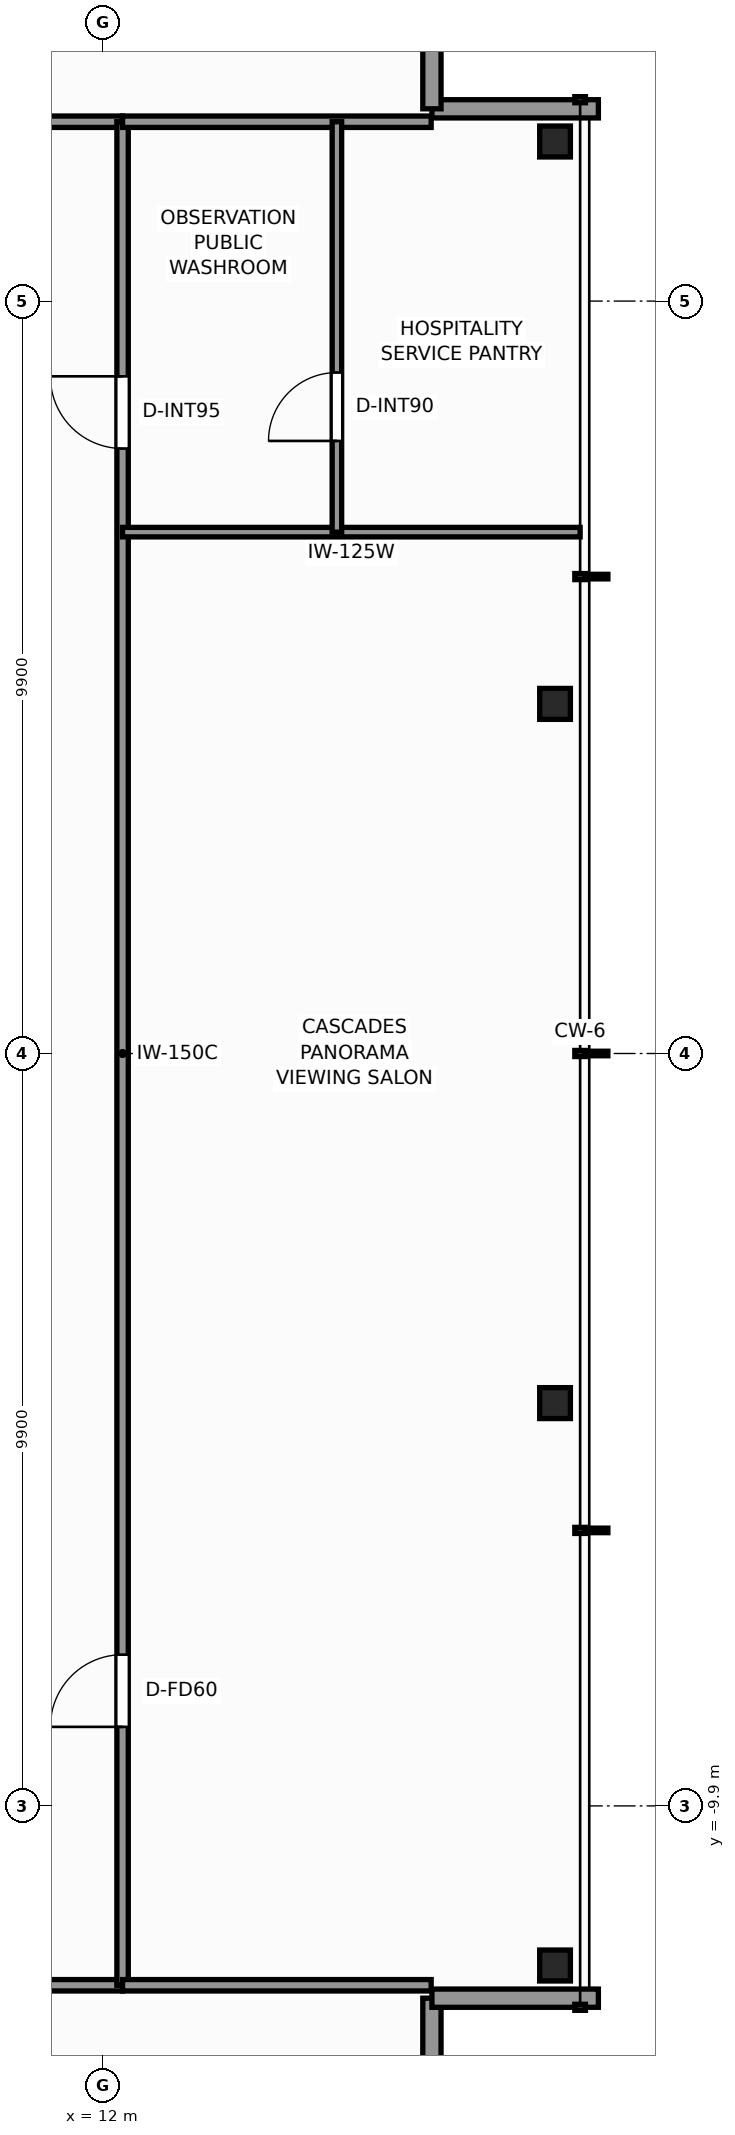
"""IFC4 building model, lengths in metres.
Left out: names, types, materials, properties, quantities, classifications, styles, units other than length and angle.
Written with IfcOpenShell. Run it as: python <this file> out.ifc"""

import sys

from ifc_helpers import new_model, si_unit, direction, frame, frame_2d, origin, origin_2d, place, context, subcontext, project, spatial, rectangle, i_section, extrude, element, fill, save


model = new_model("IFC4")
c1 = context("Model", 3, precision=1e-05, world=origin(), true_north=direction((0.0, 1.0)))
c2 = subcontext(c1, "Body", "Model", "MODEL_VIEW")
j1 = project(units=[si_unit("LENGTHUNIT", "METRE"), si_unit("PLANEANGLEUNIT", "RADIAN")], contexts=[c1])
p1 = place(None, origin())
s1 = spatial("IfcSite", under=j1, at=p1, CompositionType="ELEMENT")
p2 = place(p1, origin())
s2 = spatial("IfcBuilding", under=s1, at=p2, CompositionType="ELEMENT")
p3 = place(p2, frame((0.0, 0.0, 267.4)))
s3 = spatial("IfcBuildingStorey", under=s2, at=p3, CompositionType="ELEMENT", Elevation=267.4)
for number, where, z_axis, x_axis in (
    (1, (17.95, -12.0, 0.0), (0.0, 0.0, 1.0), (1.0, 0.0, 0.0)),
    (2, (17.95, -4.6, 0.0), (0.0, 0.0, 1.0), (1.0, 0.0, 0.0)),
    (3, (17.95, 4.6, 0.0), (0.0, 0.0, 1.0), (1.0, 0.0, 0.0)),
    (4, (17.95, 12.0, 0.0), (0.0, 0.0, 1.0), (1.0, 0.0, 0.0)),
):
    element("IfcColumn", number, at=place(p3, frame(where, z_axis=z_axis, x_axis=x_axis)), inside=s3, PredefinedType="COLUMN", context=c2, shape_type="SweptSolid", body=[
        extrude(i_section(OverallWidth=0.404, OverallDepth=0.407, WebThickness=0.027, FlangeThickness=0.044, FilletRadius=0.025, at=origin_2d()), origin(), (0.0, 0.0, 1.0), 5.0),
    ])
p4 = place(p3, frame((16.33, -12.43, 0.0), z_axis=(0.0, 0.0, 1.0), x_axis=(0.0, -1.0, 0.0)))
e5 = element("IfcWall", 5, at=p4, inside=s3, PredefinedType="STANDARD", context=c2, shape_type="SweptSolid", body=[
    extrude(rectangle(XDim=2.19, YDim=0.24, at=frame_2d((1.095, 0.0))), origin(), (0.0, 0.0, 1.0), 4.083),
])
for number, where, z_axis, x_axis in (
    (6, (18.52, -12.43, 0.0), (0.0, 0.0, 1.0), (-1.0, 0.0, 0.0)),
    (7, (16.33, 12.43, 0.0), (0.0, 0.0, 1.0), (1.0, 0.0, 0.0)),
):
    element("IfcWall", number, at=place(p3, frame(where, z_axis=z_axis, x_axis=x_axis)), inside=s3, PredefinedType="STANDARD", context=c2, shape_type="SweptSolid", body=[
        extrude(rectangle(XDim=2.19, YDim=0.24, at=frame_2d((1.095, 0.0))), origin(), (0.0, 0.0, 1.0), 4.083),
    ])
p5 = place(p3, frame((16.33, 14.62, 0.0), z_axis=(0.0, 0.0, 1.0), x_axis=(0.0, -1.0, 0.0)))
e8 = element("IfcWall", 8, at=p5, inside=s3, PredefinedType="STANDARD", context=c2, shape_type="SweptSolid", body=[
    extrude(rectangle(XDim=2.19, YDim=0.24, at=frame_2d((1.095, 0.0))), origin(), (0.0, 0.0, 1.0), 4.083),
])
p6 = place(p3, frame((-12.26, -12.26, 0.0), z_axis=(0.0, 0.0, 1.0), x_axis=(1.0, 0.0, 0.0)))
e9 = element("IfcWall", 9, at=p6, inside=s3, PredefinedType="PARTITIONING", context=c2, shape_type="SweptSolid", body=[
    extrude(rectangle(XDim=24.52, YDim=0.15, at=frame_2d((12.26, 0.0))), origin(), (0.0, 0.0, 1.0), 3.989),
])
p7 = place(p6, frame((3.6, 0.0, 0.0)))
e10 = element("IfcOpeningElement", 10, at=p7, cuts=e9, PredefinedType="OPENING", context=c2, shape_type="SweptSolid", body=[
    extrude(rectangle(XDim=1.6, YDim=2.3, at=frame_2d((0.8, 1.15))), frame((0.0, 0.085, 0.0), z_axis=(0.0, -1.0, 0.0), x_axis=(1.0, 0.0, 0.0)), (0.0, 0.0, 1.0), 0.17),
])
p8 = place(p6, frame((12.26, 0.0, 0.0)))
e11 = element("IfcOpeningElement", 11, at=p8, cuts=e9, PredefinedType="OPENING", context=c2, shape_type="SweptSolid", body=[
    extrude(rectangle(XDim=1.2, YDim=2.2, at=frame_2d((0.6, 1.1))), frame((0.0, 0.085, 0.0), z_axis=(0.0, -1.0, 0.0), x_axis=(1.0, 0.0, 0.0)), (0.0, 0.0, 1.0), 0.17),
])
p9 = place(p3, frame((-12.26, 12.26, 0.0), z_axis=(0.0, 0.0, 1.0), x_axis=(1.0, 0.0, 0.0)))
e12 = element("IfcWall", 12, at=p9, inside=s3, PredefinedType="PARTITIONING", context=c2, shape_type="SweptSolid", body=[
    extrude(rectangle(XDim=24.52, YDim=0.15, at=frame_2d((12.26, 0.0))), origin(), (0.0, 0.0, 1.0), 3.989),
])
p10 = place(p9, frame((1.8, 0.0, 0.0)))
e13 = element("IfcOpeningElement", 13, at=p10, cuts=e12, PredefinedType="OPENING", context=c2, shape_type="SweptSolid", body=[
    extrude(rectangle(XDim=0.95, YDim=2.06, at=frame_2d((0.475, 1.03))), frame((0.0, 0.085, 0.0), z_axis=(0.0, -1.0, 0.0), x_axis=(1.0, 0.0, 0.0)), (0.0, 0.0, 1.0), 0.17),
])
p11 = place(p9, frame((10.5, 0.0, 0.0)))
e14 = element("IfcOpeningElement", 14, at=p11, cuts=e12, PredefinedType="OPENING", context=c2, shape_type="SweptSolid", body=[
    extrude(rectangle(XDim=1.6, YDim=2.3, at=frame_2d((0.8, 1.15))), frame((0.0, 0.085, 0.0), z_axis=(0.0, -1.0, 0.0), x_axis=(1.0, 0.0, 0.0)), (0.0, 0.0, 1.0), 0.17),
])
p12 = place(p3, frame((12.26, -12.26, 0.0), z_axis=(0.0, 0.0, 1.0), x_axis=(0.0, 1.0, 0.0)))
e15 = element("IfcWall", 15, at=p12, inside=s3, PredefinedType="PARTITIONING", context=c2, shape_type="SweptSolid", body=[
    extrude(rectangle(XDim=24.52, YDim=0.15, at=frame_2d((12.26, 0.0))), origin(), (0.0, 0.0, 1.0), 3.989),
])
p13 = place(p12, frame((3.4, 0.0, 0.0)))
e16 = element("IfcOpeningElement", 16, at=p13, cuts=e15, PredefinedType="OPENING", context=c2, shape_type="SweptSolid", body=[
    extrude(rectangle(XDim=0.95, YDim=2.06, at=frame_2d((0.475, 1.03))), frame((0.0, 0.085, 0.0), z_axis=(0.0, -1.0, 0.0), x_axis=(1.0, 0.0, 0.0)), (0.0, 0.0, 1.0), 0.17),
])
p14 = place(p12, frame((20.22, 0.0, 0.0)))
e17 = element("IfcOpeningElement", 17, at=p14, cuts=e15, PredefinedType="OPENING", context=c2, shape_type="SweptSolid", body=[
    extrude(rectangle(XDim=0.95, YDim=2.06, at=frame_2d((0.475, 1.03))), frame((0.0, 0.085, 0.0), z_axis=(0.0, -1.0, 0.0), x_axis=(1.0, 0.0, 0.0)), (0.0, 0.0, 1.0), 0.17),
])
for number, where, z_axis, x_axis in (
    (18, (12.26, -12.26, 0.0), (0.0, 0.0, 1.0), (1.0, 0.0, 0.0)),
    (19, (12.26, 12.26, 0.0), (0.0, 0.0, 1.0), (1.0, 0.0, 0.0)),
):
    element("IfcWall", number, at=place(p3, frame(where, z_axis=z_axis, x_axis=x_axis)), inside=s3, PredefinedType="PARTITIONING", context=c2, shape_type="SweptSolid", body=[
        extrude(rectangle(XDim=4.06, YDim=0.15, at=frame_2d((2.03, 0.0))), origin(), (0.0, 0.0, 1.0), 4.7),
    ])
p15 = place(p3, frame((12.26, 6.86, 0.0), z_axis=(0.0, 0.0, 1.0), x_axis=(1.0, 0.0, 0.0)))
e20 = element("IfcWall", 20, at=p15, inside=s3, PredefinedType="PARTITIONING", context=c2, shape_type="SweptSolid", body=[
    extrude(rectangle(XDim=6.02, YDim=0.125, at=frame_2d((3.01, 0.0))), origin(), (0.0, 0.0, 1.0), 4.073),
])
p16 = place(p3, frame((15.08, 6.86, 0.0), z_axis=(0.0, 0.0, 1.0), x_axis=(0.0, 1.0, 0.0)))
e21 = element("IfcWall", 21, at=p16, inside=s3, PredefinedType="PARTITIONING", context=c2, shape_type="SweptSolid", body=[
    extrude(rectangle(XDim=5.4, YDim=0.125, at=frame_2d((2.7, 0.0))), origin(), (0.0, 0.0, 1.0), 3.989),
])
p17 = place(p16, frame((1.2, 0.0, 0.0)))
e22 = element("IfcOpeningElement", 22, at=p17, cuts=e21, PredefinedType="OPENING", context=c2, shape_type="SweptSolid", body=[
    extrude(rectangle(XDim=0.9, YDim=2.06, at=frame_2d((0.45, 1.03))), frame((0.0, 0.073, 0.0), z_axis=(0.0, -1.0, 0.0), x_axis=(1.0, 0.0, 0.0)), (0.0, 0.0, 1.0), 0.145),
])
p18 = place(p13, origin())
e23 = element("IfcDoor", 23, at=p18, inside=s3, OperationType="SINGLE_SWING_LEFT", PredefinedType="DOOR", context=c2, shape_type="SweptSolid", body=[
    extrude(rectangle(XDim=0.95, YDim=2.06, at=frame_2d((0.475, 1.03))), frame((0.0, 0.025, 0.0), z_axis=(0.0, -1.0, 0.0), x_axis=(1.0, 0.0, 0.0)), (0.0, 0.0, 1.0), 0.05),
])
fill(e16, e23)
p19 = place(p14, origin())
e24 = element("IfcDoor", 24, at=p19, inside=s3, OperationType="SINGLE_SWING_RIGHT", PredefinedType="DOOR", context=c2, shape_type="SweptSolid", body=[
    extrude(rectangle(XDim=0.95, YDim=2.06, at=frame_2d((0.475, 1.03))), frame((0.0, 0.025, 0.0), z_axis=(0.0, -1.0, 0.0), x_axis=(1.0, 0.0, 0.0)), (0.0, 0.0, 1.0), 0.05),
])
fill(e17, e24)
p20 = place(p17, origin())
e25 = element("IfcDoor", 25, at=p20, inside=s3, OperationType="SINGLE_SWING_LEFT", PredefinedType="DOOR", context=c2, shape_type="SweptSolid", body=[
    extrude(rectangle(XDim=0.9, YDim=2.06, at=frame_2d((0.45, 1.03))), frame((0.0, 0.025, 0.0), z_axis=(0.0, -1.0, 0.0), x_axis=(1.0, 0.0, 0.0)), (0.0, 0.0, 1.0), 0.05),
])
fill(e22, e25)
save(model, sys.argv[1])
